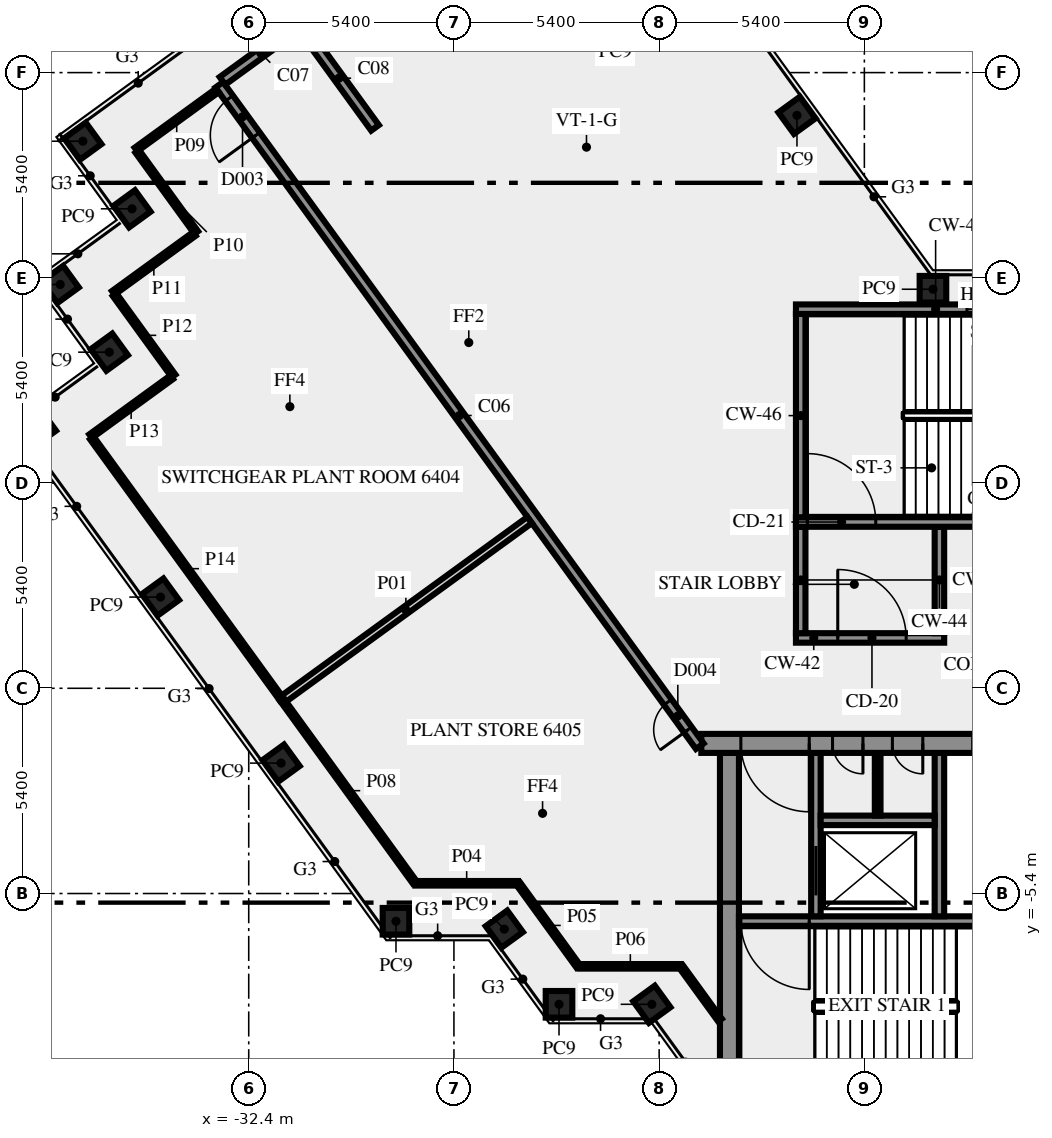
"""IFC4 building model, lengths in metres.
Left out: names, types, materials, properties, quantities, classifications, styles, units other than length and angle.
Written with IfcOpenShell. Run it as: python <this file> out.ifc"""

import sys

from ifc_helpers import new_model, si_unit, direction, frame, frame_2d, origin, origin_2d, place, context, subcontext, project, spatial, rectangle, extrude, element, fill, save


model = new_model("IFC4")
c1 = context("Model", 3, precision=1e-05, world=origin(), true_north=direction((0.0, 1.0)))
c2 = subcontext(c1, "Body", "Model", "MODEL_VIEW")
j1 = project(units=[si_unit("LENGTHUNIT", "METRE"), si_unit("PLANEANGLEUNIT", "RADIAN")], contexts=[c1])
p1 = place(None, origin())
s1 = spatial("IfcSite", under=j1, at=p1, CompositionType="ELEMENT")
p2 = place(p1, origin())
s2 = spatial("IfcBuilding", under=s1, at=p2, CompositionType="ELEMENT")
p3 = place(p2, frame((0.0, 0.0, 273.0)))
s3 = spatial("IfcBuildingStorey", under=s2, at=p3, CompositionType="ELEMENT", Elevation=273.0)
for number, where, z_axis, x_axis in (
    (1, (-17.974, 15.075, 0.0), (0.0, 0.0, 1.0), (-0.588, 0.809, 0.0)),
    (2, (-36.765, 14.395, 0.0), (0.0, 0.0, 1.0), (0.588, -0.809, 0.0)),
    (3, (-35.471, 12.616, 0.0), (0.0, 0.0, 1.0), (-0.809, -0.588, 0.0)),
    (4, (-37.36, 10.625, 0.0), (0.0, 0.0, 1.0), (0.588, -0.809, 0.0)),
    (5, (-36.068, 8.844, 0.0), (0.0, 0.0, 1.0), (0.588, -0.809, 0.0)),
    (6, (-37.96, 6.855, 0.0), (0.0, 0.0, 1.0), (0.588, -0.809, 0.0)),
    (7, (-34.722, 2.4, 0.0), (0.0, 0.0, 1.0), (0.588, -0.809, 0.0)),
    (8, (-31.548, -1.969, 0.0), (0.0, 0.0, 1.0), (0.588, -0.809, 0.0)),
    (9, (-28.525, -6.13, 0.0), (0.0, 0.0, 1.0), (1.0, 0.0, 0.0)),
    (10, (-25.674, -6.337, 0.0), (0.0, 0.0, 1.0), (0.588, -0.809, 0.0)),
    (11, (-24.235, -8.315, 0.0), (0.0, 0.0, 1.0), (1.0, 0.0, 0.0)),
    (12, (-21.792, -8.315, 0.0), (0.0, 0.0, 1.0), (0.588, -0.809, 0.0)),
    (13, (-14.395, 10.5, 0.0), (0.0, 0.0, 1.0), (-1.0, 0.0, 0.0)),
):
    element("IfcColumn", number, at=place(p3, frame(where, z_axis=z_axis, x_axis=x_axis)), inside=s3, PredefinedType="COLUMN", context=c2, shape_type="SweptSolid", body=[
        extrude(rectangle(XDim=0.7, YDim=0.7, at=origin_2d()), origin(), (0.0, 0.0, 1.0), 7.65),
    ])
p4 = place(p3, frame((-19.75, -10.5, 0.0), z_axis=(0.0, 0.0, 1.0), x_axis=(0.0, 1.0, 0.0)))
e14 = element("IfcWall", 14, at=p4, inside=s3, PredefinedType="SHEAR", context=c2, shape_type="SweptSolid", body=[
    extrude(rectangle(XDim=8.8, YDim=0.5, at=frame_2d((4.4, 0.0))), origin(), (0.0, 0.0, 1.0), 7.65),
])
p5 = place(p3, frame((-11.45, -6.125, 0.0), z_axis=(0.0, 0.0, 1.0), x_axis=(-1.0, 0.0, 0.0)))
e15 = element("IfcWall", 15, at=p5, inside=s3, PredefinedType="SHEAR", context=c2, shape_type="SweptSolid", body=[
    extrude(rectangle(XDim=8.05, YDim=0.25, at=frame_2d((4.025, 0.0))), origin(), (0.0, 0.0, 1.0), 7.65),
])
p6 = place(p5, frame((6.2, 0.0, 0.0)))
e16 = element("IfcOpeningElement", 16, at=p6, cuts=e15, PredefinedType="OPENING", context=c2, shape_type="SweptSolid", body=[
    extrude(rectangle(XDim=1.8, YDim=2.1, at=frame_2d((0.9, 1.05))), frame((0.0, 0.135, 0.0), z_axis=(0.0, -1.0, 0.0), x_axis=(1.0, 0.0, 0.0)), (0.0, 0.0, 1.0), 0.27),
])
p7 = place(p3, frame((-17.475, -6.0, 0.0), z_axis=(0.0, 0.0, 1.0), x_axis=(0.0, 1.0, 0.0)))
e17 = element("IfcWall", 17, at=p7, inside=s3, PredefinedType="SHEAR", context=c2, shape_type="SweptSolid", body=[
    extrude(rectangle(XDim=4.3, YDim=0.25, at=frame_2d((2.15, 0.0))), origin(), (0.0, 0.0, 1.0), 7.65),
])
p8 = place(p7, frame((0.55, 0.0, 0.0)))
e18 = element("IfcOpeningElement", 18, at=p8, cuts=e17, PredefinedType="OPENING", context=c2, shape_type="SweptSolid", body=[
    extrude(rectangle(XDim=1.3, YDim=2.1, at=frame_2d((0.65, 1.05))), frame((0.0, 0.135, 0.0), z_axis=(0.0, -1.0, 0.0), x_axis=(1.0, 0.0, 0.0)), (0.0, 0.0, 1.0), 0.27),
])
p9 = place(p3, frame((-14.225, -6.0, 0.0), z_axis=(0.0, 0.0, 1.0), x_axis=(0.0, 1.0, 0.0)))
e19 = element("IfcWall", 19, at=p9, inside=s3, PredefinedType="SHEAR", context=c2, shape_type="SweptSolid", body=[
    extrude(rectangle(XDim=4.3, YDim=0.25, at=frame_2d((2.15, 0.0))), origin(), (0.0, 0.0, 1.0), 7.65),
])
p10 = place(p3, frame((-17.35, -3.475, 0.0), z_axis=(0.0, 0.0, 1.0), x_axis=(1.0, 0.0, 0.0)))
e20 = element("IfcWall", 20, at=p10, inside=s3, PredefinedType="SHEAR", context=c2, shape_type="SweptSolid", body=[
    extrude(rectangle(XDim=3.0, YDim=0.25, at=frame_2d((1.5, 0.0))), origin(), (0.0, 0.0, 1.0), 7.65),
])
p11 = place(p3, frame((-15.85, -3.35, 0.0), z_axis=(0.0, 0.0, 1.0), x_axis=(0.0, 1.0, 0.0)))
e21 = element("IfcWall", 21, at=p11, inside=s3, PredefinedType="PARTITIONING", context=c2, shape_type="SweptSolid", body=[
    extrude(rectangle(XDim=1.65, YDim=0.15, at=frame_2d((0.825, 0.0))), origin(), (0.0, 0.0, 1.0), 7.65),
])
p12 = place(p3, frame((20.49, -1.45, 0.0), z_axis=(0.0, 0.0, 1.0), x_axis=(-1.0, 0.0, 0.0)))
e22 = element("IfcWall", 22, at=p12, inside=s3, PredefinedType="SHEAR", context=c2, shape_type="SweptSolid", body=[
    extrude(rectangle(XDim=40.98, YDim=0.5, at=frame_2d((20.49, 0.0))), origin(), (0.0, 0.0, 1.0), 7.65),
])
p13 = place(p12, frame((38.14, 0.0, 0.0)))
e23 = element("IfcOpeningElement", 23, at=p13, cuts=e22, PredefinedType="OPENING", context=c2, shape_type="SweptSolid", body=[
    extrude(rectangle(XDim=1.8, YDim=2.1, at=frame_2d((0.9, 1.05))), frame((0.0, 0.26, 0.0), z_axis=(0.0, -1.0, 0.0), x_axis=(1.0, 0.0, 0.0)), (0.0, 0.0, 1.0), 0.52),
])
p14 = place(p12, frame((36.728, 0.0, 0.0)))
e24 = element("IfcOpeningElement", 24, at=p14, cuts=e22, PredefinedType="OPENING", context=c2, shape_type="SweptSolid", body=[
    extrude(rectangle(XDim=0.8, YDim=2.1, at=frame_2d((0.4, 1.05))), frame((0.0, 0.26, 0.0), z_axis=(0.0, -1.0, 0.0), x_axis=(1.0, 0.0, 0.0)), (0.0, 0.0, 1.0), 0.52),
])
p15 = place(p12, frame((35.153, 0.0, 0.0)))
e25 = element("IfcOpeningElement", 25, at=p15, cuts=e22, PredefinedType="OPENING", context=c2, shape_type="SweptSolid", body=[
    extrude(rectangle(XDim=0.8, YDim=2.1, at=frame_2d((0.4, 1.05))), frame((0.0, 0.26, 0.0), z_axis=(0.0, -1.0, 0.0), x_axis=(1.0, 0.0, 0.0)), (0.0, 0.0, 1.0), 0.52),
])
p16 = place(p12, frame((32.94, 0.0, 0.0)))
e26 = element("IfcOpeningElement", 26, at=p16, cuts=e22, PredefinedType="OPENING", context=c2, shape_type="SweptSolid", body=[
    extrude(rectangle(XDim=0.9, YDim=2.1, at=frame_2d((0.45, 1.05))), frame((0.0, 0.26, 0.0), z_axis=(0.0, -1.0, 0.0), x_axis=(1.0, 0.0, 0.0)), (0.0, 0.0, 1.0), 0.52),
])
p17 = place(p12, frame((20.74, 0.0, 0.0)))
e27 = element("IfcOpeningElement", 27, at=p17, cuts=e22, PredefinedType="OPENING", context=c2, shape_type="SweptSolid", body=[
    extrude(rectangle(XDim=2.0, YDim=2.1, at=frame_2d((1.0, 1.05))), frame((0.0, 0.26, 0.0), z_axis=(0.0, -1.0, 0.0), x_axis=(1.0, 0.0, 0.0)), (0.0, 0.0, 1.0), 0.52),
])
p18 = place(p12, frame((14.903, 0.0, 0.0)))
e28 = element("IfcOpeningElement", 28, at=p18, cuts=e22, PredefinedType="OPENING", context=c2, shape_type="SweptSolid", body=[
    extrude(rectangle(XDim=0.9, YDim=2.1, at=frame_2d((0.45, 1.05))), frame((0.0, 0.26, 0.0), z_axis=(0.0, -1.0, 0.0), x_axis=(1.0, 0.0, 0.0)), (0.0, 0.0, 1.0), 0.52),
])
p19 = place(p12, frame((12.54, 0.0, 0.0)))
e29 = element("IfcOpeningElement", 29, at=p19, cuts=e22, PredefinedType="OPENING", context=c2, shape_type="SweptSolid", body=[
    extrude(rectangle(XDim=0.9, YDim=2.1, at=frame_2d((0.45, 1.05))), frame((0.0, 0.26, 0.0), z_axis=(0.0, -1.0, 0.0), x_axis=(1.0, 0.0, 0.0)), (0.0, 0.0, 1.0), 0.52),
])
p20 = place(p12, frame((9.877, 0.0, 0.0)))
e30 = element("IfcOpeningElement", 30, at=p20, cuts=e22, PredefinedType="OPENING", context=c2, shape_type="SweptSolid", body=[
    extrude(rectangle(XDim=0.9, YDim=2.1, at=frame_2d((0.45, 1.05))), frame((0.0, 0.26, 0.0), z_axis=(0.0, -1.0, 0.0), x_axis=(1.0, 0.0, 0.0)), (0.0, 0.0, 1.0), 0.52),
])
p21 = place(p12, frame((7.14, 0.0, 0.0)))
e31 = element("IfcOpeningElement", 31, at=p21, cuts=e22, PredefinedType="OPENING", context=c2, shape_type="SweptSolid", body=[
    extrude(rectangle(XDim=0.9, YDim=2.1, at=frame_2d((0.45, 1.05))), frame((0.0, 0.26, 0.0), z_axis=(0.0, -1.0, 0.0), x_axis=(1.0, 0.0, 0.0)), (0.0, 0.0, 1.0), 0.52),
])
p22 = place(p12, frame((4.19, 0.0, 0.0)))
e32 = element("IfcOpeningElement", 32, at=p22, cuts=e22, PredefinedType="OPENING", context=c2, shape_type="SweptSolid", body=[
    extrude(rectangle(XDim=0.9, YDim=2.1, at=frame_2d((0.45, 1.05))), frame((0.0, 0.26, 0.0), z_axis=(0.0, -1.0, 0.0), x_axis=(1.0, 0.0, 0.0)), (0.0, 0.0, 1.0), 0.52),
])
p23 = place(p12, frame((1.04, 0.0, 0.0)))
e33 = element("IfcOpeningElement", 33, at=p23, cuts=e22, PredefinedType="OPENING", context=c2, shape_type="SweptSolid", body=[
    extrude(rectangle(XDim=1.8, YDim=2.1, at=frame_2d((0.9, 1.05))), frame((0.0, 0.26, 0.0), z_axis=(0.0, -1.0, 0.0), x_axis=(1.0, 0.0, 0.0)), (0.0, 0.0, 1.0), 0.52),
])
p24 = place(p3, frame((-18.0, 1.325, 0.0), z_axis=(0.0, 0.0, 1.0), x_axis=(1.0, 0.0, 0.0)))
e34 = element("IfcWall", 34, at=p24, inside=s3, PredefinedType="SHEAR", context=c2, shape_type="SweptSolid", body=[
    extrude(rectangle(XDim=3.9, YDim=0.25, at=frame_2d((1.95, 0.0))), origin(), (0.0, 0.0, 1.0), 7.65),
])
p25 = place(p24, frame((1.1, 0.0, 0.0)))
e35 = element("IfcOpeningElement", 35, at=p25, cuts=e34, PredefinedType="OPENING", context=c2, shape_type="SweptSolid", body=[
    extrude(rectangle(XDim=1.8, YDim=2.1, at=frame_2d((0.9, 1.05))), frame((0.0, 0.135, 0.0), z_axis=(0.0, -1.0, 0.0), x_axis=(1.0, 0.0, 0.0)), (0.0, 0.0, 1.0), 0.27),
])
for number, where, z_axis, x_axis in (
    (36, (-17.875, 1.45, 0.0), (0.0, 0.0, 1.0), (0.0, 1.0, 0.0)),
    (37, (-14.225, 1.45, 0.0), (0.0, 0.0, 1.0), (0.0, 1.0, 0.0)),
):
    element("IfcWall", number, at=place(p3, frame(where, z_axis=z_axis, x_axis=x_axis)), inside=s3, PredefinedType="SHEAR", context=c2, shape_type="SweptSolid", body=[
        extrude(rectangle(XDim=2.8, YDim=0.25, at=frame_2d((1.4, 0.0))), origin(), (0.0, 0.0, 1.0), 7.65),
    ])
p26 = place(p3, frame((-18.0, 4.375, 0.0), z_axis=(0.0, 0.0, 1.0), x_axis=(1.0, 0.0, 0.0)))
e38 = element("IfcWall", 38, at=p26, inside=s3, PredefinedType="SHEAR", context=c2, shape_type="SweptSolid", body=[
    extrude(rectangle(XDim=10.5, YDim=0.25, at=frame_2d((5.25, 0.0))), origin(), (0.0, 0.0, 1.0), 7.65),
])
p27 = place(p26, frame((0.3, 0.0, 0.0)))
e39 = element("IfcOpeningElement", 39, at=p27, cuts=e38, PredefinedType="OPENING", context=c2, shape_type="SweptSolid", body=[
    extrude(rectangle(XDim=1.8, YDim=2.1, at=frame_2d((0.9, 1.05))), frame((0.0, 0.135, 0.0), z_axis=(0.0, -1.0, 0.0), x_axis=(1.0, 0.0, 0.0)), (0.0, 0.0, 1.0), 0.27),
])
p28 = place(p3, frame((-17.875, 4.5, 0.0), z_axis=(0.0, 0.0, 1.0), x_axis=(0.0, 1.0, 0.0)))
e40 = element("IfcWall", 40, at=p28, inside=s3, PredefinedType="SHEAR", context=c2, shape_type="SweptSolid", body=[
    extrude(rectangle(XDim=5.35, YDim=0.25, at=frame_2d((2.675, 0.0))), origin(), (0.0, 0.0, 1.0), 7.65),
])
p29 = place(p3, frame((-18.0, 9.975, 0.0), z_axis=(0.0, 0.0, 1.0), x_axis=(1.0, 0.0, 0.0)))
e41 = element("IfcWall", 41, at=p29, inside=s3, PredefinedType="SHEAR", context=c2, shape_type="SweptSolid", body=[
    extrude(rectangle(XDim=10.5, YDim=0.25, at=frame_2d((5.25, 0.0))), origin(), (0.0, 0.0, 1.0), 7.65),
])
p30 = place(p29, frame((4.5, 0.0, 1.0)))
e42 = element("IfcOpeningElement", 42, at=p30, cuts=e41, PredefinedType="OPENING", context=c2, shape_type="SweptSolid", body=[
    extrude(rectangle(XDim=1.2, YDim=1.2, at=frame_2d((0.6, 0.6))), frame((0.0, 0.135, 0.0), z_axis=(0.0, -1.0, 0.0), x_axis=(1.0, 0.0, 0.0)), (0.0, 0.0, 1.0), 0.27),
])
p31 = place(p3, frame((-20.531, -1.523, 0.0), z_axis=(0.0, 0.0, 1.0), x_axis=(-0.587782944784, 0.809018670873, 0.0)))
e43 = element("IfcWall", 43, at=p31, inside=s3, PredefinedType="SOLIDWALL", context=c2, shape_type="SweptSolid", body=[
    extrude(rectangle(XDim=21.512, YDim=0.25, at=frame_2d((10.756, 0.0))), origin(), (0.0, 0.0, 1.0), 7.65),
])
p32 = place(p31, frame((0.533, 0.0, 0.0)))
e44 = element("IfcOpeningElement", 44, at=p32, cuts=e43, PredefinedType="OPENING", context=c2, shape_type="SweptSolid", body=[
    extrude(rectangle(XDim=0.9, YDim=2.1, at=frame_2d((0.45, 1.05))), frame((0.0, 0.135, 0.0), z_axis=(0.0, -1.0, 0.0), x_axis=(1.0, 0.0, 0.0)), (0.0, 0.0, 1.0), 0.27),
])
p33 = place(p31, frame((19.87, 0.0, 0.0)))
e45 = element("IfcOpeningElement", 45, at=p33, cuts=e43, PredefinedType="OPENING", context=c2, shape_type="SweptSolid", body=[
    extrude(rectangle(XDim=1.2, YDim=2.1, at=frame_2d((0.6, 1.05))), frame((0.0, 0.135, 0.0), z_axis=(0.0, -1.0, 0.0), x_axis=(1.0, 0.0, 0.0)), (0.0, 0.0, 1.0), 0.27),
])
p34 = place(p3, frame((-33.091, 15.983, 0.0), z_axis=(0.0, 0.0, 1.0), x_axis=(0.809011863271, 0.587792314586, 0.0)))
e46 = element("IfcWall", 46, at=p34, inside=s3, PredefinedType="SOLIDWALL", context=c2, shape_type="SweptSolid", body=[
    extrude(rectangle(XDim=2.488, YDim=0.25, at=frame_2d((1.244, 0.0))), origin(), (0.0, 0.0, 1.0), 7.65),
])
p35 = place(p3, frame((-30.976, 17.361, 0.0), z_axis=(0.0, 0.0, 1.0), x_axis=(0.587807801954, -0.809000610606, 0.0)))
e47 = element("IfcWall", 47, at=p35, inside=s3, PredefinedType="SOLIDWALL", context=c2, shape_type="SweptSolid", body=[
    extrude(rectangle(XDim=3.232, YDim=0.25, at=frame_2d((1.616, 0.0))), origin(), (0.0, 0.0, 1.0), 7.65),
])
p36 = place(p3, frame((-25.008, 4.427, 0.0), z_axis=(0.0, 0.0, 1.0), x_axis=(-0.809016634131, -0.587785748125, 0.0)))
e48 = element("IfcWall", 48, at=p36, inside=s3, PredefinedType="SOLIDWALL", context=c2, shape_type="SweptSolid", body=[
    extrude(rectangle(XDim=8.051, YDim=0.2, at=frame_2d((4.025, 0.0))), origin(), (0.0, 0.0, 1.0), 7.65),
])
p37 = place(p3, frame((-28.015, -5.131, 0.0), z_axis=(0.0, 0.0, 1.0), x_axis=(1.0, 0.0, 0.0)))
e49 = element("IfcWall", 49, at=p37, inside=s3, PredefinedType="PARTITIONING", context=c2, shape_type="SweptSolid", body=[
    extrude(rectangle(XDim=2.7, YDim=0.12, at=frame_2d((1.35, 0.0))), origin(), (0.0, 0.0, 1.0), 7.65),
])
p38 = place(p3, frame((-25.292, -5.163, 0.0), z_axis=(0.0, 0.0, 1.0), x_axis=(0.587669599435, -0.809101008466, 0.0)))
e50 = element("IfcWall", 50, at=p38, inside=s3, PredefinedType="PARTITIONING", context=c2, shape_type="SweptSolid", body=[
    extrude(rectangle(XDim=2.66, YDim=0.12, at=frame_2d((1.33, 0.0))), origin(), (0.0, 0.0, 1.0), 7.65),
])
p39 = place(p3, frame((-23.688, -7.316, 0.0), z_axis=(0.0, 0.0, 1.0), x_axis=(1.0, 0.0, 0.0)))
e51 = element("IfcWall", 51, at=p39, inside=s3, PredefinedType="PARTITIONING", context=c2, shape_type="SweptSolid", body=[
    extrude(rectangle(XDim=2.66, YDim=0.12, at=frame_2d((1.33, 0.0))), origin(), (0.0, 0.0, 1.0), 7.65),
])
p40 = place(p3, frame((-21.004, -7.348, 0.0), z_axis=(0.0, 0.0, 1.0), x_axis=(0.588018712203, -0.808847324345, 0.0)))
e52 = element("IfcWall", 52, at=p40, inside=s3, PredefinedType="PARTITIONING", context=c2, shape_type="SweptSolid", body=[
    extrude(rectangle(XDim=1.708, YDim=0.12, at=frame_2d((0.854, 0.0))), origin(), (0.0, 0.0, 1.0), 7.65),
])
p41 = place(p3, frame((-31.533, -0.289, 0.0), z_axis=(0.0, 0.0, 1.0), x_axis=(0.587788268014, -0.809014803317, 0.0)))
e53 = element("IfcWall", 53, at=p41, inside=s3, PredefinedType="PARTITIONING", context=c2, shape_type="SweptSolid", body=[
    extrude(rectangle(XDim=5.945, YDim=0.12, at=frame_2d((2.973, 0.0))), origin(), (0.0, 0.0, 1.0), 7.65),
])
p42 = place(p3, frame((-33.223, 15.733, 0.0), z_axis=(0.0, 0.0, 1.0), x_axis=(-0.808994936898, -0.587815610607, 0.0)))
e54 = element("IfcWall", 54, at=p42, inside=s3, PredefinedType="PARTITIONING", context=c2, shape_type="SweptSolid", body=[
    extrude(rectangle(XDim=2.65, YDim=0.12, at=frame_2d((1.325, 0.0))), origin(), (0.0, 0.0, 1.0), 7.65),
])
p43 = place(p3, frame((-35.332, 14.126, 0.0), z_axis=(0.0, 0.0, 1.0), x_axis=(0.587423619839, -0.809279612282, 0.0)))
e55 = element("IfcWall", 55, at=p43, inside=s3, PredefinedType="PARTITIONING", context=c2, shape_type="SweptSolid", body=[
    extrude(rectangle(XDim=2.64, YDim=0.12, at=frame_2d((1.32, 0.0))), origin(), (0.0, 0.0, 1.0), 7.65),
])
p44 = place(p3, frame((-33.83, 11.955, 0.0), z_axis=(0.0, 0.0, 1.0), x_axis=(-0.809068095178, -0.587714911641, 0.0)))
e56 = element("IfcWall", 56, at=p44, inside=s3, PredefinedType="PARTITIONING", context=c2, shape_type="SweptSolid", body=[
    extrude(rectangle(XDim=2.638, YDim=0.12, at=frame_2d((1.319, 0.0))), origin(), (0.0, 0.0, 1.0), 7.65),
])
p45 = place(p3, frame((-35.929, 10.355, 0.0), z_axis=(0.0, 0.0, 1.0), x_axis=(0.587423619839, -0.809279612282, 0.0)))
e57 = element("IfcWall", 57, at=p45, inside=s3, PredefinedType="PARTITIONING", context=c2, shape_type="SweptSolid", body=[
    extrude(rectangle(XDim=2.64, YDim=0.12, at=frame_2d((1.32, 0.0))), origin(), (0.0, 0.0, 1.0), 7.65),
])
p46 = place(p3, frame((-34.427, 8.184, 0.0), z_axis=(0.0, 0.0, 1.0), x_axis=(-0.808892087594, -0.587957133325, 0.0)))
e58 = element("IfcWall", 58, at=p46, inside=s3, PredefinedType="PARTITIONING", context=c2, shape_type="SweptSolid", body=[
    extrude(rectangle(XDim=2.639, YDim=0.12, at=frame_2d((1.319, 0.0))), origin(), (0.0, 0.0, 1.0), 7.65),
])
p47 = place(p3, frame((-36.526, 6.583, 0.0), z_axis=(0.0, 0.0, 1.0), x_axis=(0.587744391111, -0.809046680185, 0.0)))
e59 = element("IfcWall", 59, at=p47, inside=s3, PredefinedType="PARTITIONING", context=c2, shape_type="SweptSolid", body=[
    extrude(rectangle(XDim=8.495, YDim=0.12, at=frame_2d((4.247, 0.0))), origin(), (0.0, 0.0, 1.0), 7.65),
])
p48 = place(p6, origin())
e60 = element("IfcDoor", 60, at=p48, inside=s3, OperationType="DOUBLE_DOOR_SINGLE_SWING", PredefinedType="DOOR", context=c2, shape_type="SweptSolid", body=[
    extrude(rectangle(XDim=1.8, YDim=2.1, at=frame_2d((0.9, 1.05))), frame((0.0, 0.025, 0.0), z_axis=(0.0, -1.0, 0.0), x_axis=(1.0, 0.0, 0.0)), (0.0, 0.0, 1.0), 0.05),
])
fill(e16, e60)
p49 = place(p8, origin())
e61 = element("IfcDoor", 61, at=p49, inside=s3, OperationType="DOUBLE_DOOR_SLIDING", PredefinedType="DOOR", context=c2, shape_type="SweptSolid", body=[
    extrude(rectangle(XDim=1.3, YDim=2.1, at=frame_2d((0.65, 1.05))), frame((0.0, 0.025, 0.0), z_axis=(0.0, -1.0, 0.0), x_axis=(1.0, 0.0, 0.0)), (0.0, 0.0, 1.0), 0.05),
])
fill(e18, e61)
p50 = place(p13, origin())
e62 = element("IfcDoor", 62, at=p50, inside=s3, OperationType="DOUBLE_DOOR_SINGLE_SWING", PredefinedType="DOOR", context=c2, shape_type="SweptSolid", body=[
    extrude(rectangle(XDim=1.8, YDim=2.1, at=frame_2d((0.9, 1.05))), frame((0.0, 0.025, 0.0), z_axis=(0.0, -1.0, 0.0), x_axis=(1.0, 0.0, 0.0)), (0.0, 0.0, 1.0), 0.05),
])
fill(e23, e62)
p51 = place(p14, origin())
e63 = element("IfcDoor", 63, at=p51, inside=s3, OperationType="SINGLE_SWING_RIGHT", PredefinedType="DOOR", context=c2, shape_type="SweptSolid", body=[
    extrude(rectangle(XDim=0.8, YDim=2.1, at=frame_2d((0.4, 1.05))), frame((0.0, 0.025, 0.0), z_axis=(0.0, -1.0, 0.0), x_axis=(1.0, 0.0, 0.0)), (0.0, 0.0, 1.0), 0.05),
])
fill(e24, e63)
p52 = place(p15, origin())
e64 = element("IfcDoor", 64, at=p52, inside=s3, OperationType="SINGLE_SWING_RIGHT", PredefinedType="DOOR", context=c2, shape_type="SweptSolid", body=[
    extrude(rectangle(XDim=0.8, YDim=2.1, at=frame_2d((0.4, 1.05))), frame((0.0, 0.025, 0.0), z_axis=(0.0, -1.0, 0.0), x_axis=(1.0, 0.0, 0.0)), (0.0, 0.0, 1.0), 0.05),
])
fill(e25, e64)
p53 = place(p25, origin())
e65 = element("IfcDoor", 65, at=p53, inside=s3, OperationType="DOUBLE_DOOR_SINGLE_SWING", PredefinedType="DOOR", context=c2, shape_type="SweptSolid", body=[
    extrude(rectangle(XDim=1.8, YDim=2.1, at=frame_2d((0.9, 1.05))), frame((0.0, 0.025, 0.0), z_axis=(0.0, -1.0, 0.0), x_axis=(1.0, 0.0, 0.0)), (0.0, 0.0, 1.0), 0.05),
])
fill(e35, e65)
p54 = place(p27, origin())
e66 = element("IfcDoor", 66, at=p54, inside=s3, OperationType="DOUBLE_DOOR_SINGLE_SWING", PredefinedType="DOOR", context=c2, shape_type="SweptSolid", body=[
    extrude(rectangle(XDim=1.8, YDim=2.1, at=frame_2d((0.9, 1.05))), frame((0.0, 0.025, 0.0), z_axis=(0.0, -1.0, 0.0), x_axis=(1.0, 0.0, 0.0)), (0.0, 0.0, 1.0), 0.05),
])
fill(e39, e66)
p55 = place(p30, origin())
e67 = element("IfcWindow", 67, at=p55, inside=s3, PartitioningType="SINGLE_PANEL", PredefinedType="WINDOW", context=c2, shape_type="SweptSolid", body=[
    extrude(rectangle(XDim=1.2, YDim=1.2, at=frame_2d((0.6, 0.6))), frame((0.0, 0.03, 0.0), z_axis=(0.0, -1.0, 0.0), x_axis=(1.0, 0.0, 0.0)), (0.0, 0.0, 1.0), 0.06),
])
fill(e42, e67)
p56 = place(p32, origin())
e68 = element("IfcDoor", 68, at=p56, inside=s3, OperationType="SINGLE_SWING_LEFT", PredefinedType="DOOR", context=c2, shape_type="SweptSolid", body=[
    extrude(rectangle(XDim=0.9, YDim=2.1, at=frame_2d((0.45, 1.05))), frame((0.0, 0.025, 0.0), z_axis=(0.0, -1.0, 0.0), x_axis=(1.0, 0.0, 0.0)), (0.0, 0.0, 1.0), 0.05),
])
fill(e44, e68)
p57 = place(p33, origin())
e69 = element("IfcDoor", 69, at=p57, inside=s3, OperationType="SINGLE_SWING_RIGHT", PredefinedType="DOOR", context=c2, shape_type="SweptSolid", body=[
    extrude(rectangle(XDim=1.2, YDim=2.1, at=frame_2d((0.6, 1.05))), frame((0.0, 0.025, 0.0), z_axis=(0.0, -1.0, 0.0), x_axis=(1.0, 0.0, 0.0)), (0.0, 0.0, 1.0), 0.05),
])
fill(e45, e69)
save(model, sys.argv[1])
